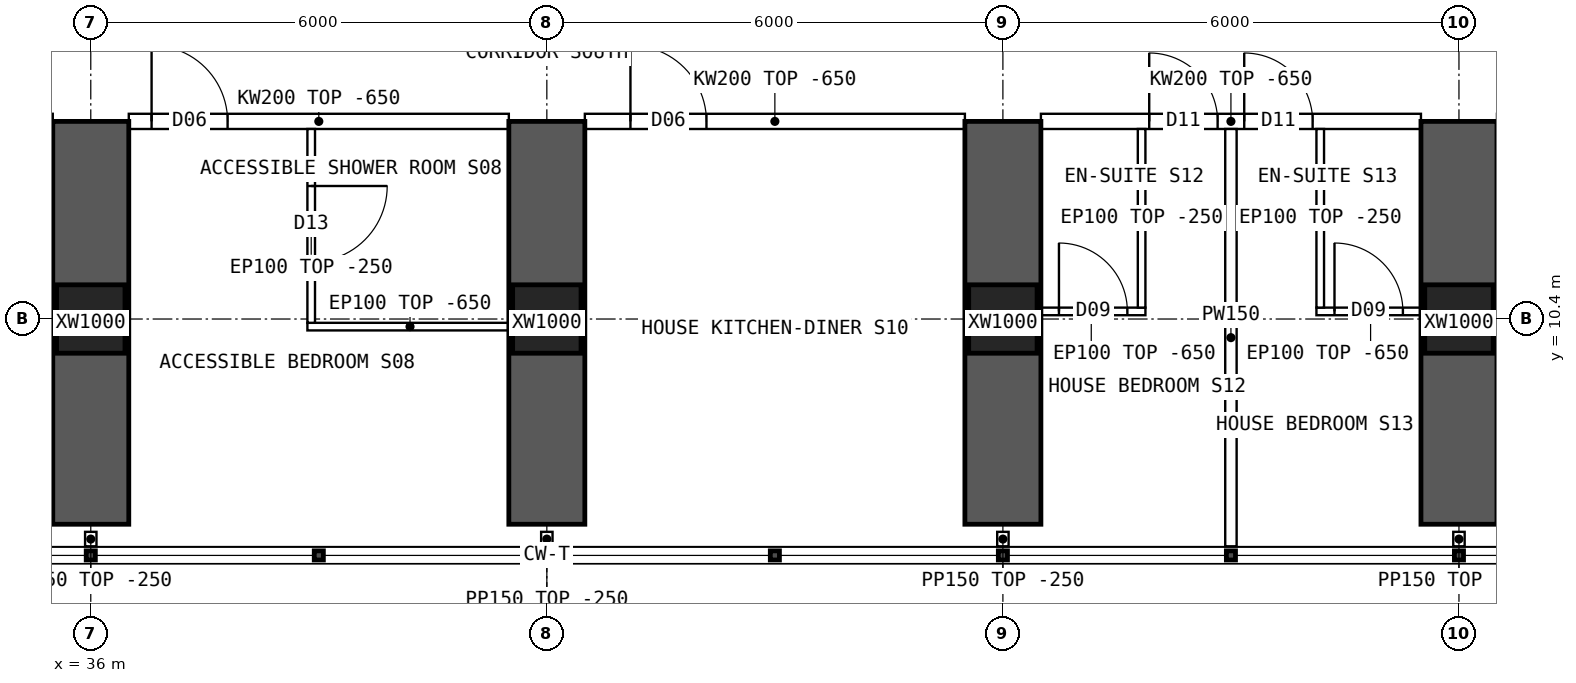
"""IFC4 building model, lengths in metres.
Left out: names, types, materials, properties, quantities, classifications, styles, units other than length and angle.
Written with IfcOpenShell. Run it as: python <this file> out.ifc"""

import sys

from ifc_helpers import new_model, si_unit, direction, frame, frame_2d, origin, origin_2d, place, context, subcontext, project, spatial, polyline, rectangle, hollow_rectangle, outline, extrude, element, fill, save


model = new_model("IFC4")
c1 = context("Model", 3, precision=1e-05, world=origin(), true_north=direction((0.0, 1.0)))
c2 = subcontext(c1, "Body", "Model", "MODEL_VIEW")
j1 = project(units=[si_unit("LENGTHUNIT", "METRE"), si_unit("PLANEANGLEUNIT", "RADIAN")], contexts=[c1])
p1 = place(None, origin())
s1 = spatial("IfcSite", under=j1, at=p1, CompositionType="ELEMENT")
p2 = place(p1, origin())
s2 = spatial("IfcBuilding", under=s1, at=p2, CompositionType="ELEMENT")
p3 = place(p2, frame((0.0, 0.0, 23.95)))
s3 = spatial("IfcBuildingStorey", under=s2, at=p3, CompositionType="ELEMENT", Elevation=23.95)
for number, where, z_axis, x_axis in (
    (1, (36.0, 10.4, 0.0), (0.0, 0.0, 1.0), (1.0, 0.0, 0.0)),
    (2, (42.0, 10.4, 0.0), (0.0, 0.0, 1.0), (1.0, 0.0, 0.0)),
    (3, (48.0, 10.4, 0.0), (0.0, 0.0, 1.0), (1.0, 0.0, 0.0)),
    (4, (54.0, 10.4, 0.0), (0.0, 0.0, 1.0), (1.0, 0.0, 0.0)),
):
    element("IfcColumn", number, at=place(p3, frame(where, z_axis=z_axis, x_axis=x_axis)), inside=s3, PredefinedType="COLUMN", context=c2, shape_type="SweptSolid", body=[
        extrude(hollow_rectangle(XDim=0.9, YDim=0.9, WallThickness=0.09, at=origin_2d()), origin(), (0.0, 0.0, 1.0), 3.75),
    ])
for number, where, z_axis, x_axis in (
    (5, (36.0, 7.7, 0.0), (0.0, 0.0, 1.0), (0.0, 1.0, 0.0)),
    (6, (42.0, 7.7, 0.0), (0.0, 0.0, 1.0), (0.0, 1.0, 0.0)),
    (7, (48.0, 7.7, 0.0), (0.0, 0.0, 1.0), (0.0, 1.0, 0.0)),
    (8, (54.0, 7.7, 0.0), (0.0, 0.0, 1.0), (0.0, 1.0, 0.0)),
):
    element("IfcWall", number, at=place(p3, frame(where, z_axis=z_axis, x_axis=x_axis)), inside=s3, PredefinedType="SHEAR", context=c2, shape_type="SweptSolid", body=[
        extrude(rectangle(XDim=5.3, YDim=1.0, at=frame_2d((2.65, 0.0))), origin(), (0.0, 0.0, 1.0), 3.75),
    ])
p4 = place(p3, frame((36.5, 13.0, 0.0), z_axis=(0.0, 0.0, 1.0), x_axis=(1.0, 0.0, 0.0)))
e9 = element("IfcWall", 9, at=p4, inside=s3, PredefinedType="SOLIDWALL", context=c2, shape_type="SweptSolid", body=[
    extrude(outline(polyline([(0.0, 0.0), (5.0, 0.0), (5.0, 3.1), (0.0, 3.1), (0.0, 0.0)])), frame((0.0, 0.1, 0.0), z_axis=(0.0, -1.0, 0.0), x_axis=(1.0, 0.0, 0.0)), (0.0, 0.0, 1.0), 0.2),
])
p5 = place(p4, frame((0.3, 0.0, 0.0)))
e10 = element("IfcOpeningElement", 10, at=p5, cuts=e9, PredefinedType="OPENING", context=c2, shape_type="SweptSolid", body=[
    extrude(rectangle(XDim=1.0, YDim=2.1, at=frame_2d((0.5, 1.05))), frame((0.0, 0.11, 0.0), z_axis=(0.0, -1.0, 0.0), x_axis=(1.0, 0.0, 0.0)), (0.0, 0.0, 1.0), 0.22),
])
p6 = place(p3, frame((42.5, 13.0, 0.0), z_axis=(0.0, 0.0, 1.0), x_axis=(1.0, 0.0, 0.0)))
e11 = element("IfcWall", 11, at=p6, inside=s3, PredefinedType="SOLIDWALL", context=c2, shape_type="SweptSolid", body=[
    extrude(outline(polyline([(0.0, 0.0), (5.0, 0.0), (5.0, 3.1), (0.0, 3.1), (0.0, 0.0)])), frame((0.0, 0.1, 0.0), z_axis=(0.0, -1.0, 0.0), x_axis=(1.0, 0.0, 0.0)), (0.0, 0.0, 1.0), 0.2),
])
p7 = place(p6, frame((0.6, 0.0, 0.0)))
e12 = element("IfcOpeningElement", 12, at=p7, cuts=e11, PredefinedType="OPENING", context=c2, shape_type="SweptSolid", body=[
    extrude(rectangle(XDim=1.0, YDim=2.1, at=frame_2d((0.5, 1.05))), frame((0.0, 0.11, 0.0), z_axis=(0.0, -1.0, 0.0), x_axis=(1.0, 0.0, 0.0)), (0.0, 0.0, 1.0), 0.22),
])
p8 = place(p3, frame((48.5, 13.0, 0.0), z_axis=(0.0, 0.0, 1.0), x_axis=(1.0, 0.0, 0.0)))
e13 = element("IfcWall", 13, at=p8, inside=s3, PredefinedType="SOLIDWALL", context=c2, shape_type="SweptSolid", body=[
    extrude(outline(polyline([(0.0, 0.0), (5.0, 0.0), (5.0, 3.1), (0.0, 3.1), (0.0, 0.0)])), frame((0.0, 0.1, 0.0), z_axis=(0.0, -1.0, 0.0), x_axis=(1.0, 0.0, 0.0)), (0.0, 0.0, 1.0), 0.2),
])
p9 = place(p8, frame((1.425, 0.0, 0.0)))
e14 = element("IfcOpeningElement", 14, at=p9, cuts=e13, PredefinedType="OPENING", context=c2, shape_type="SweptSolid", body=[
    extrude(rectangle(XDim=0.9, YDim=2.1, at=frame_2d((0.45, 1.05))), frame((0.0, 0.11, 0.0), z_axis=(0.0, -1.0, 0.0), x_axis=(1.0, 0.0, 0.0)), (0.0, 0.0, 1.0), 0.22),
])
p10 = place(p8, frame((2.675, 0.0, 0.0)))
e15 = element("IfcOpeningElement", 15, at=p10, cuts=e13, PredefinedType="OPENING", context=c2, shape_type="SweptSolid", body=[
    extrude(rectangle(XDim=0.9, YDim=2.1, at=frame_2d((0.45, 1.05))), frame((0.0, 0.11, 0.0), z_axis=(0.0, -1.0, 0.0), x_axis=(1.0, 0.0, 0.0)), (0.0, 0.0, 1.0), 0.22),
])
p11 = place(p3, frame((35.55, 10.5, 0.0), z_axis=(0.0, 0.0, 1.0), x_axis=(-1.0, 0.0, 0.0)))
e16 = element("IfcWall", 16, at=p11, inside=s3, PredefinedType="PARTITIONING", context=c2, shape_type="SweptSolid", body=[
    extrude(outline(polyline([(0.0, 0.0), (1.425, 0.0), (1.425, 3.1), (0.0, 3.1), (0.0, 0.0)])), frame((0.0, 0.05, 0.0), z_axis=(0.0, -1.0, 0.0), x_axis=(1.0, 0.0, 0.0)), (0.0, 0.0, 1.0), 0.1),
])
p12 = place(p11, frame((0.288, 0.0, 0.0)))
e17 = element("IfcOpeningElement", 17, at=p12, cuts=e16, PredefinedType="OPENING", context=c2, shape_type="SweptSolid", body=[
    extrude(rectangle(XDim=0.9, YDim=2.1, at=frame_2d((0.45, 1.05))), frame((0.0, 0.06, 0.0), z_axis=(0.0, -1.0, 0.0), x_axis=(1.0, 0.0, 0.0)), (0.0, 0.0, 1.0), 0.12),
])
p13 = place(p3, frame((38.85, 10.3, 0.0), z_axis=(0.0, 0.0, 1.0), x_axis=(1.0, 0.0, 0.0)))
e18 = element("IfcWall", 18, at=p13, inside=s3, PredefinedType="PARTITIONING", context=c2, shape_type="SweptSolid", body=[
    extrude(outline(polyline([(0.0, 0.0), (2.7, 0.0), (2.7, 3.1), (0.0, 3.1), (0.0, 0.0)])), frame((0.0, 0.05, 0.0), z_axis=(0.0, -1.0, 0.0), x_axis=(1.0, 0.0, 0.0)), (0.0, 0.0, 1.0), 0.1),
])
p14 = place(p3, frame((38.9, 10.35, 0.0), z_axis=(0.0, 0.0, 1.0), x_axis=(0.0, 1.0, 0.0)))
e19 = element("IfcWall", 19, at=p14, inside=s3, PredefinedType="PARTITIONING", context=c2, shape_type="SweptSolid", body=[
    extrude(outline(polyline([(0.0, 0.0), (2.55, 0.0), (2.55, 3.1), (2.502, 3.1), (2.5, 3.5), (0.252, 3.5), (0.25, 3.1), (0.0, 3.1), (0.0, 0.0)])), frame((0.0, 0.05, 0.0), z_axis=(0.0, -1.0, 0.0), x_axis=(1.0, 0.0, 0.0)), (0.0, 0.0, 1.0), 0.1),
])
p15 = place(p14, frame((0.8, 0.0, 0.0)))
e20 = element("IfcOpeningElement", 20, at=p15, cuts=e19, PredefinedType="OPENING", context=c2, shape_type="SweptSolid", body=[
    extrude(rectangle(XDim=1.0, YDim=2.1, at=frame_2d((0.5, 1.05))), frame((0.0, 0.06, 0.0), z_axis=(0.0, -1.0, 0.0), x_axis=(1.0, 0.0, 0.0)), (0.0, 0.0, 1.0), 0.12),
])
p16 = place(p3, frame((51.0, 7.41, 0.0), z_axis=(0.0, 0.0, 1.0), x_axis=(0.0, 1.0, 0.0)))
e21 = element("IfcWall", 21, at=p16, inside=s3, PredefinedType="PARTITIONING", context=c2, shape_type="SweptSolid", body=[
    extrude(outline(polyline([(0.0, 0.0), (5.49, 0.0), (5.49, 3.1), (5.442, 3.1), (5.44, 3.5), (3.192, 3.5), (3.19, 3.1), (2.792, 3.1), (2.79, 3.5), (0.0, 3.5), (0.0, 0.0)])), frame((0.0, 0.075, 0.0), z_axis=(0.0, -1.0, 0.0), x_axis=(1.0, 0.0, 0.0)), (0.0, 0.0, 1.0), 0.15),
])
p17 = place(p3, frame((49.875, 10.5, 0.0), z_axis=(0.0, 0.0, 1.0), x_axis=(-1.0, 0.0, 0.0)))
e22 = element("IfcWall", 22, at=p17, inside=s3, PredefinedType="PARTITIONING", context=c2, shape_type="SweptSolid", body=[
    extrude(outline(polyline([(0.0, 0.0), (1.425, 0.0), (1.425, 3.1), (0.0, 3.1), (0.0, 0.0)])), frame((0.0, 0.05, 0.0), z_axis=(0.0, -1.0, 0.0), x_axis=(1.0, 0.0, 0.0)), (0.0, 0.0, 1.0), 0.1),
])
p18 = place(p17, frame((0.238, 0.0, 0.0)))
e23 = element("IfcOpeningElement", 23, at=p18, cuts=e22, PredefinedType="OPENING", context=c2, shape_type="SweptSolid", body=[
    extrude(rectangle(XDim=0.9, YDim=2.1, at=frame_2d((0.45, 1.05))), frame((0.0, 0.06, 0.0), z_axis=(0.0, -1.0, 0.0), x_axis=(1.0, 0.0, 0.0)), (0.0, 0.0, 1.0), 0.12),
])
p19 = place(p3, frame((49.825, 10.55, 0.0), z_axis=(0.0, 0.0, 1.0), x_axis=(0.0, 1.0, 0.0)))
e24 = element("IfcWall", 24, at=p19, inside=s3, PredefinedType="PARTITIONING", context=c2, shape_type="SweptSolid", body=[
    extrude(outline(polyline([(0.0, 0.0), (2.35, 0.0), (2.35, 3.1), (2.302, 3.1), (2.3, 3.5), (0.052, 3.5), (0.05, 3.1), (0.0, 3.1), (0.0, 0.0)])), frame((0.0, 0.05, 0.0), z_axis=(0.0, -1.0, 0.0), x_axis=(1.0, 0.0, 0.0)), (0.0, 0.0, 1.0), 0.1),
])
p20 = place(p3, frame((53.55, 10.5, 0.0), z_axis=(0.0, 0.0, 1.0), x_axis=(-1.0, 0.0, 0.0)))
e25 = element("IfcWall", 25, at=p20, inside=s3, PredefinedType="PARTITIONING", context=c2, shape_type="SweptSolid", body=[
    extrude(outline(polyline([(0.0, 0.0), (1.425, 0.0), (1.425, 3.1), (0.0, 3.1), (0.0, 0.0)])), frame((0.0, 0.05, 0.0), z_axis=(0.0, -1.0, 0.0), x_axis=(1.0, 0.0, 0.0)), (0.0, 0.0, 1.0), 0.1),
])
p21 = place(p20, frame((0.288, 0.0, 0.0)))
e26 = element("IfcOpeningElement", 26, at=p21, cuts=e25, PredefinedType="OPENING", context=c2, shape_type="SweptSolid", body=[
    extrude(rectangle(XDim=0.9, YDim=2.1, at=frame_2d((0.45, 1.05))), frame((0.0, 0.06, 0.0), z_axis=(0.0, -1.0, 0.0), x_axis=(1.0, 0.0, 0.0)), (0.0, 0.0, 1.0), 0.12),
])
p22 = place(p3, frame((52.175, 10.55, 0.0), z_axis=(0.0, 0.0, 1.0), x_axis=(0.0, 1.0, 0.0)))
e27 = element("IfcWall", 27, at=p22, inside=s3, PredefinedType="PARTITIONING", context=c2, shape_type="SweptSolid", body=[
    extrude(outline(polyline([(0.0, 0.0), (2.35, 0.0), (2.35, 3.1), (2.302, 3.1), (2.3, 3.5), (0.052, 3.5), (0.05, 3.1), (0.0, 3.1), (0.0, 0.0)])), frame((0.0, 0.05, 0.0), z_axis=(0.0, -1.0, 0.0), x_axis=(1.0, 0.0, 0.0)), (0.0, 0.0, 1.0), 0.1),
])
for number, where, z_axis, x_axis in (
    (28, (36.0, 7.6, 0.0), (0.0, 0.0, 1.0), (0.0, -1.0, 0.0)),
    (29, (42.0, 7.6, 0.0), (0.0, 0.0, 1.0), (0.0, -1.0, 0.0)),
    (30, (48.0, 7.6, 0.0), (0.0, 0.0, 1.0), (0.0, -1.0, 0.0)),
    (31, (54.0, 7.6, 0.0), (0.0, 0.0, 1.0), (0.0, -1.0, 0.0)),
):
    element("IfcWall", number, at=place(p3, frame(where, z_axis=z_axis, x_axis=x_axis)), inside=s3, PredefinedType="PARTITIONING", context=c2, shape_type="SweptSolid", body=[
        extrude(rectangle(XDim=0.19, YDim=0.15, at=frame_2d((0.095, 0.0))), origin(), (0.0, 0.0, 1.0), 3.5),
    ])
p23 = place(p15, origin())
e32 = element("IfcDoor", 32, at=p23, inside=s3, OperationType="SINGLE_SWING_RIGHT", PredefinedType="DOOR", context=c2, shape_type="SweptSolid", body=[
    extrude(rectangle(XDim=1.0, YDim=2.1, at=frame_2d((0.5, 1.05))), frame((0.0, 0.025, 0.0), z_axis=(0.0, -1.0, 0.0), x_axis=(1.0, 0.0, 0.0)), (0.0, 0.0, 1.0), 0.05),
])
fill(e20, e32)
p24 = place(p5, origin())
e33 = element("IfcDoor", 33, at=p24, inside=s3, OperationType="SINGLE_SWING_LEFT", PredefinedType="DOOR", context=c2, shape_type="SweptSolid", body=[
    extrude(rectangle(XDim=1.0, YDim=2.1, at=frame_2d((0.5, 1.05))), frame((0.0, 0.025, 0.0), z_axis=(0.0, -1.0, 0.0), x_axis=(1.0, 0.0, 0.0)), (0.0, 0.0, 1.0), 0.05),
])
fill(e10, e33)
p25 = place(p7, origin())
e34 = element("IfcDoor", 34, at=p25, inside=s3, OperationType="SINGLE_SWING_LEFT", PredefinedType="DOOR", context=c2, shape_type="SweptSolid", body=[
    extrude(rectangle(XDim=1.0, YDim=2.1, at=frame_2d((0.5, 1.05))), frame((0.0, 0.025, 0.0), z_axis=(0.0, -1.0, 0.0), x_axis=(1.0, 0.0, 0.0)), (0.0, 0.0, 1.0), 0.05),
])
fill(e12, e34)
p26 = place(p18, origin())
e35 = element("IfcDoor", 35, at=p26, inside=s3, OperationType="SINGLE_SWING_RIGHT", PredefinedType="DOOR", context=c2, shape_type="SweptSolid", body=[
    extrude(rectangle(XDim=0.9, YDim=2.1, at=frame_2d((0.45, 1.05))), frame((0.0, 0.025, 0.0), z_axis=(0.0, -1.0, 0.0), x_axis=(1.0, 0.0, 0.0)), (0.0, 0.0, 1.0), 0.05),
])
fill(e23, e35)
p27 = place(p9, origin())
e36 = element("IfcDoor", 36, at=p27, inside=s3, OperationType="SINGLE_SWING_LEFT", PredefinedType="DOOR", context=c2, shape_type="SweptSolid", body=[
    extrude(rectangle(XDim=0.9, YDim=2.1, at=frame_2d((0.45, 1.05))), frame((0.0, 0.025, 0.0), z_axis=(0.0, -1.0, 0.0), x_axis=(1.0, 0.0, 0.0)), (0.0, 0.0, 1.0), 0.05),
])
fill(e14, e36)
p28 = place(p21, origin())
e37 = element("IfcDoor", 37, at=p28, inside=s3, OperationType="SINGLE_SWING_RIGHT", PredefinedType="DOOR", context=c2, shape_type="SweptSolid", body=[
    extrude(rectangle(XDim=0.9, YDim=2.1, at=frame_2d((0.45, 1.05))), frame((0.0, 0.025, 0.0), z_axis=(0.0, -1.0, 0.0), x_axis=(1.0, 0.0, 0.0)), (0.0, 0.0, 1.0), 0.05),
])
fill(e26, e37)
p29 = place(p10, origin())
e38 = element("IfcDoor", 38, at=p29, inside=s3, OperationType="SINGLE_SWING_LEFT", PredefinedType="DOOR", context=c2, shape_type="SweptSolid", body=[
    extrude(rectangle(XDim=0.9, YDim=2.1, at=frame_2d((0.45, 1.05))), frame((0.0, 0.025, 0.0), z_axis=(0.0, -1.0, 0.0), x_axis=(1.0, 0.0, 0.0)), (0.0, 0.0, 1.0), 0.05),
])
fill(e15, e38)
save(model, sys.argv[1])
